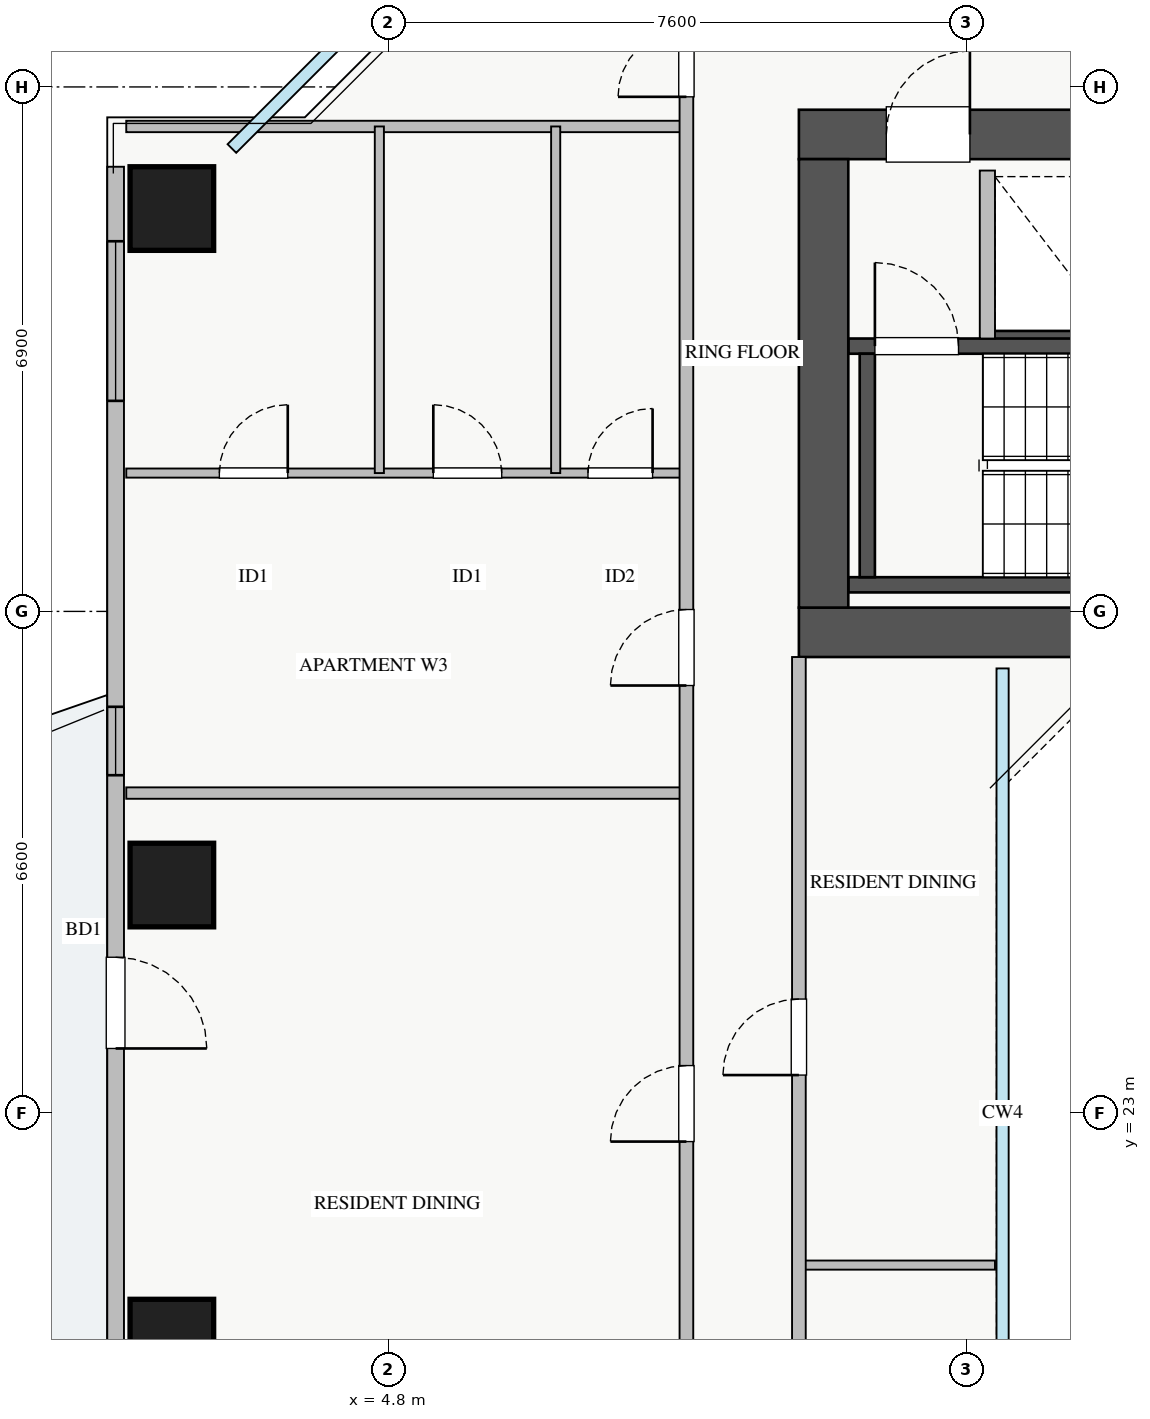
"""IFC4 building model, lengths in metres.
Left out: names, types, materials, properties, quantities, classifications, styles, units other than length and angle.
Written with IfcOpenShell. Run it as: python <this file> out.ifc"""

import sys

from ifc_helpers import new_model, si_unit, direction, frame, frame_2d, origin, origin_2d, place, context, subcontext, project, spatial, rectangle, extrude, source, transform, mapped, element, fill, save


model = new_model("IFC4")
c1 = context("Model", 3, precision=1e-05, world=origin(), true_north=direction((0.0, 1.0)))
c2 = subcontext(c1, "Body", "Model", "MODEL_VIEW")
j1 = project(units=[si_unit("LENGTHUNIT", "METRE"), si_unit("PLANEANGLEUNIT", "RADIAN")], contexts=[c1])
p1 = place(None, origin())
s1 = spatial("IfcSite", under=j1, at=p1, CompositionType="ELEMENT")
p2 = place(p1, origin())
s2 = spatial("IfcBuilding", under=s1, at=p2, CompositionType="ELEMENT")
p3 = place(p2, frame((0.0, 0.0, 126.25)))
s3 = spatial("IfcBuildingStorey", under=s2, at=p3, CompositionType="ELEMENT", Elevation=126.25)
p4 = place(p3, frame((12.68, 33.2, 0.0), z_axis=(0.0, 0.0, 1.0), x_axis=(1.0, 0.0, 0.0)))
e1 = element("IfcWall", 1, at=p4, inside=s3, PredefinedType="SHEAR", context=c2, shape_type="SweptSolid", body=[
    extrude(rectangle(XDim=1.94, YDim=0.18, at=frame_2d((0.97, 0.0))), origin(), (0.0, 0.0, 1.0), 3.07),
])
p5 = place(p3, frame((10.85, 29.95, 0.0), z_axis=(0.0, 0.0, 1.0), x_axis=(1.0, 0.0, 0.0)))
e2 = element("IfcWall", 2, at=p5, inside=s3, PredefinedType="SHEAR", context=c2, shape_type="SweptSolid", body=[
    extrude(rectangle(XDim=7.3, YDim=0.2, at=frame_2d((3.65, 0.0))), origin(), (0.0, 0.0, 1.0), 3.25),
])
p6 = place(p3, frame((10.85, 33.09, 0.0), z_axis=(0.0, 0.0, 1.0), x_axis=(1.0, 0.0, 0.0)))
e3 = element("IfcWall", 3, at=p6, inside=s3, PredefinedType="SHEAR", context=c2, shape_type="SweptSolid", body=[
    extrude(rectangle(XDim=7.3, YDim=0.2, at=frame_2d((3.65, 0.0))), origin(), (0.0, 0.0, 1.0), 3.25),
])
p7 = place(p6, frame((0.35, 0.0, 0.0)))
e4 = element("IfcOpeningElement", 4, at=p7, cuts=e3, PredefinedType="OPENING", context=c2, shape_type="SweptSolid", body=[
    extrude(rectangle(XDim=1.1, YDim=2.05, at=frame_2d((0.55, 1.025))), frame((0.0, 0.11, 0.0), z_axis=(0.0, -1.0, 0.0), x_axis=(1.0, 0.0, 0.0)), (0.0, 0.0, 1.0), 0.22),
])
p8 = place(p3, frame((11.1, 30.05, 0.0), z_axis=(0.0, 0.0, 1.0), x_axis=(0.0, 1.0, 0.0)))
e5 = element("IfcWall", 5, at=p8, inside=s3, PredefinedType="SHEAR", context=c2, shape_type="SweptSolid", body=[
    extrude(rectangle(XDim=2.94, YDim=0.2, at=frame_2d((1.47, 0.0))), origin(), (0.0, 0.0, 1.0), 3.25),
])
p9 = place(p3, frame((10.2, 29.325, 0.0), z_axis=(0.0, 0.0, 1.0), x_axis=(1.0, 0.0, 0.0)))
e6 = element("IfcWall", 6, at=p9, inside=s3, PredefinedType="SHEAR", context=c2, shape_type="SweptSolid", body=[
    extrude(rectangle(XDim=17.6, YDim=0.65, at=frame_2d((8.8, 0.0))), origin(), (0.0, 0.0, 1.0), 3.25),
])
p10 = place(p3, frame((10.2, 35.875, 0.0), z_axis=(0.0, 0.0, 1.0), x_axis=(1.0, 0.0, 0.0)))
e7 = element("IfcWall", 7, at=p10, inside=s3, PredefinedType="SHEAR", context=c2, shape_type="SweptSolid", body=[
    extrude(rectangle(XDim=17.6, YDim=0.65, at=frame_2d((8.8, 0.0))), origin(), (0.0, 0.0, 1.0), 3.25),
])
p11 = place(p10, frame((1.15, 0.0, 0.0)))
e8 = element("IfcOpeningElement", 8, at=p11, cuts=e7, PredefinedType="OPENING", context=c2, shape_type="SweptSolid", body=[
    extrude(rectangle(XDim=1.1, YDim=2.05, at=frame_2d((0.55, 1.025))), frame((0.0, 0.335, 0.0), z_axis=(0.0, -1.0, 0.0), x_axis=(1.0, 0.0, 0.0)), (0.0, 0.0, 1.0), 0.67),
])
p12 = place(p10, frame((8.3, 0.0, 0.0)))
e9 = element("IfcOpeningElement", 9, at=p12, cuts=e7, PredefinedType="OPENING", context=c2, shape_type="SweptSolid", body=[
    extrude(rectangle(XDim=1.1, YDim=2.05, at=frame_2d((0.55, 1.025))), frame((0.0, 0.335, 0.0), z_axis=(0.0, -1.0, 0.0), x_axis=(1.0, 0.0, 0.0)), (0.0, 0.0, 1.0), 0.67),
])
p13 = place(p10, frame((4.9, 0.0, 0.0)))
e10 = element("IfcOpeningElement", 10, at=p13, cuts=e7, PredefinedType="OPENING", context=c2, shape_type="SweptSolid", body=[
    extrude(rectangle(XDim=1.1, YDim=2.05, at=frame_2d((0.55, 1.025))), frame((0.0, 0.335, 0.0), z_axis=(0.0, -1.0, 0.0), x_axis=(1.0, 0.0, 0.0)), (0.0, 0.0, 1.0), 0.67),
])
p14 = place(p10, frame((14.74, 0.0, 0.0)))
e11 = element("IfcOpeningElement", 11, at=p14, cuts=e7, PredefinedType="OPENING", context=c2, shape_type="SweptSolid", body=[
    extrude(rectangle(XDim=1.0, YDim=2.05, at=frame_2d((0.5, 1.025))), frame((0.0, 0.335, 0.0), z_axis=(0.0, -1.0, 0.0), x_axis=(1.0, 0.0, 0.0)), (0.0, 0.0, 1.0), 0.67),
])
p15 = place(p10, frame((10.175, 0.0, 0.0)))
e12 = element("IfcOpeningElement", 12, at=p15, cuts=e7, PredefinedType="OPENING", context=c2, shape_type="SweptSolid", body=[
    extrude(rectangle(XDim=1.0, YDim=2.05, at=frame_2d((0.5, 1.025))), frame((0.0, 0.335, 0.0), z_axis=(0.0, -1.0, 0.0), x_axis=(1.0, 0.0, 0.0)), (0.0, 0.0, 1.0), 0.67),
])
p16 = place(p10, frame((12.625, 0.0, 0.0)))
e13 = element("IfcOpeningElement", 13, at=p16, cuts=e7, PredefinedType="OPENING", context=c2, shape_type="SweptSolid", body=[
    extrude(rectangle(XDim=1.0, YDim=2.05, at=frame_2d((0.5, 1.025))), frame((0.0, 0.335, 0.0), z_axis=(0.0, -1.0, 0.0), x_axis=(1.0, 0.0, 0.0)), (0.0, 0.0, 1.0), 0.67),
])
p17 = place(p3, frame((10.525, 29.65, 0.0), z_axis=(0.0, 0.0, 1.0), x_axis=(0.0, 1.0, 0.0)))
e14 = element("IfcWall", 14, at=p17, inside=s3, PredefinedType="SHEAR", context=c2, shape_type="SweptSolid", body=[
    extrude(rectangle(XDim=5.9, YDim=0.65, at=frame_2d((2.95, 0.0))), origin(), (0.0, 0.0, 1.0), 3.25),
])
m1 = source(origin(), c2, "Body", "SweptSolid", [
    extrude(rectangle(XDim=1.1, YDim=1.1, at=origin_2d()), origin(), (0.0, 0.0, 1.0), 3.25),
])
for number, where, z_axis, x_axis in (
    (15, (1.95, 34.9, 0.0), (0.0, 0.0, 1.0), (1.0, 0.0, 0.0)),
    (16, (1.95, 26.0, 0.0), (0.0, 0.0, 1.0), (1.0, 0.0, 0.0)),
    (17, (1.95, 20.0, 0.0), (0.0, 0.0, 1.0), (1.0, 0.0, 0.0)),
):
    element("IfcColumn", number, at=place(p3, frame(where, z_axis=z_axis, x_axis=x_axis)), inside=s3, PredefinedType="COLUMN", context=c2, shape_type="MappedRepresentation", body=[
        mapped(m1, transform((0.0, 0.0, 0.0), x_axis=(1.0, 0.0, 0.0), y_axis=(0.0, 1.0, 0.0), z_axis=(0.0, 0.0, 1.0), scale=1.0)),
    ])
p18 = place(p3, frame((1.21, 10.55, 0.0), z_axis=(0.0, 0.0, 1.0), x_axis=(0.0, 1.0, 0.0)))
e18 = element("IfcWall", 18, at=p18, inside=s3, PredefinedType="STANDARD", context=c2, shape_type="SweptSolid", body=[
    extrude(rectangle(XDim=24.9, YDim=0.22, at=frame_2d((12.45, 0.0))), origin(), (0.0, 0.0, 1.0), 2.61),
])
p19 = place(p18, frame((13.3, 0.0, 0.0)))
e19 = element("IfcOpeningElement", 19, at=p19, cuts=e18, PredefinedType="OPENING", context=c2, shape_type="SweptSolid", body=[
    extrude(rectangle(XDim=1.2, YDim=2.1, at=frame_2d((0.6, 1.05))), frame((0.0, 0.12, 0.0), z_axis=(0.0, -1.0, 0.0), x_axis=(1.0, 0.0, 0.0)), (0.0, 0.0, 1.0), 0.24),
])
p20 = place(p18, frame((0.625, 0.0, 0.9)))
e20 = element("IfcOpeningElement", 20, at=p20, cuts=e18, PredefinedType="OPENING", context=c2, shape_type="SweptSolid", body=[
    extrude(rectangle(XDim=2.4, YDim=1.5, at=frame_2d((1.2, 0.75))), frame((0.0, 0.12, 0.0), z_axis=(0.0, -1.0, 0.0), x_axis=(1.0, 0.0, 0.0)), (0.0, 0.0, 1.0), 0.24),
])
p21 = place(p18, frame((21.82, 0.0, 0.9)))
e21 = element("IfcOpeningElement", 21, at=p21, cuts=e18, PredefinedType="OPENING", context=c2, shape_type="SweptSolid", body=[
    extrude(rectangle(XDim=2.1, YDim=1.5, at=frame_2d((1.05, 0.75))), frame((0.0, 0.12, 0.0), z_axis=(0.0, -1.0, 0.0), x_axis=(1.0, 0.0, 0.0)), (0.0, 0.0, 1.0), 0.24),
])
p22 = place(p18, frame((4.847, 0.0, 0.9)))
e22 = element("IfcOpeningElement", 22, at=p22, cuts=e18, PredefinedType="OPENING", context=c2, shape_type="SweptSolid", body=[
    extrude(rectangle(XDim=2.4, YDim=1.5, at=frame_2d((1.2, 0.75))), frame((0.0, 0.12, 0.0), z_axis=(0.0, -1.0, 0.0), x_axis=(1.0, 0.0, 0.0)), (0.0, 0.0, 1.0), 0.24),
])
p23 = place(p18, frame((16.895, 0.0, 0.9)))
e23 = element("IfcOpeningElement", 23, at=p23, cuts=e18, PredefinedType="OPENING", context=c2, shape_type="SweptSolid", body=[
    extrude(rectangle(XDim=0.9, YDim=1.2, at=frame_2d((0.45, 0.6))), frame((0.0, 0.12, 0.0), z_axis=(0.0, -1.0, 0.0), x_axis=(1.0, 0.0, 0.0)), (0.0, 0.0, 1.0), 0.24),
])
p24 = place(p3, frame((12.68, 33.19, 0.0), z_axis=(0.0, 0.0, 1.0), x_axis=(0.0, 1.0, 0.0)))
e24 = element("IfcWall", 24, at=p24, inside=s3, PredefinedType="PARTITIONING", context=c2, shape_type="SweptSolid", body=[
    extrude(rectangle(XDim=2.21, YDim=0.2, at=frame_2d((1.105, 0.0))), origin(), (0.0, 0.0, 1.0), 3.07),
])
p25 = place(p3, frame((1.35, 35.98, 0.0), z_axis=(0.0, 0.0, 1.0), x_axis=(1.0, 0.0, 0.0)))
e25 = element("IfcWall", 25, at=p25, inside=s3, PredefinedType="PARTITIONING", context=c2, shape_type="SweptSolid", body=[
    extrude(rectangle(XDim=7.37, YDim=0.15, at=frame_2d((3.685, 0.0))), origin(), (0.0, 0.0, 1.0), 3.07),
])
p26 = place(p3, frame((1.35, 31.42, 0.0), z_axis=(0.0, 0.0, 1.0), x_axis=(1.0, 0.0, 0.0)))
e26 = element("IfcWall", 26, at=p26, inside=s3, PredefinedType="PLUMBINGWALL", context=c2, shape_type="SweptSolid", body=[
    extrude(rectangle(XDim=7.37, YDim=0.12, at=frame_2d((3.685, 0.0))), origin(), (0.0, 0.0, 1.0), 3.07),
])
p27 = place(p26, frame((1.225, 0.0, 0.0)))
e27 = element("IfcOpeningElement", 27, at=p27, cuts=e26, PredefinedType="OPENING", context=c2, shape_type="SweptSolid", body=[
    extrude(rectangle(XDim=0.9, YDim=2.05, at=frame_2d((0.45, 1.025))), frame((0.0, 0.07, 0.0), z_axis=(0.0, -1.0, 0.0), x_axis=(1.0, 0.0, 0.0)), (0.0, 0.0, 1.0), 0.14),
])
p28 = place(p26, frame((4.04, 0.0, 0.0)))
e28 = element("IfcOpeningElement", 28, at=p28, cuts=e26, PredefinedType="OPENING", context=c2, shape_type="SweptSolid", body=[
    extrude(rectangle(XDim=0.9, YDim=2.05, at=frame_2d((0.45, 1.025))), frame((0.0, 0.07, 0.0), z_axis=(0.0, -1.0, 0.0), x_axis=(1.0, 0.0, 0.0)), (0.0, 0.0, 1.0), 0.14),
])
p29 = place(p26, frame((6.075, 0.0, 0.0)))
e29 = element("IfcOpeningElement", 29, at=p29, cuts=e26, PredefinedType="OPENING", context=c2, shape_type="SweptSolid", body=[
    extrude(rectangle(XDim=0.85, YDim=2.05, at=frame_2d((0.425, 1.025))), frame((0.0, 0.07, 0.0), z_axis=(0.0, -1.0, 0.0), x_axis=(1.0, 0.0, 0.0)), (0.0, 0.0, 1.0), 0.14),
])
p30 = place(p3, frame((4.68, 31.42, 0.0), z_axis=(0.0, 0.0, 1.0), x_axis=(0.0, 1.0, 0.0)))
e30 = element("IfcWall", 30, at=p30, inside=s3, PredefinedType="PLUMBINGWALL", context=c2, shape_type="SweptSolid", body=[
    extrude(rectangle(XDim=4.56, YDim=0.12, at=frame_2d((2.28, 0.0))), origin(), (0.0, 0.0, 1.0), 3.07),
])
p31 = place(p3, frame((7.0, 31.42, 0.0), z_axis=(0.0, 0.0, 1.0), x_axis=(0.0, 1.0, 0.0)))
e31 = element("IfcWall", 31, at=p31, inside=s3, PredefinedType="PLUMBINGWALL", context=c2, shape_type="SweptSolid", body=[
    extrude(rectangle(XDim=4.56, YDim=0.12, at=frame_2d((2.28, 0.0))), origin(), (0.0, 0.0, 1.0), 2.577),
])
p32 = place(p3, frame((1.35, 27.21, 0.0), z_axis=(0.0, 0.0, 1.0), x_axis=(1.0, 0.0, 0.0)))
e32 = element("IfcWall", 32, at=p32, inside=s3, PredefinedType="PARTITIONING", context=c2, shape_type="SweptSolid", body=[
    extrude(rectangle(XDim=7.37, YDim=0.15, at=frame_2d((3.685, 0.0))), origin(), (0.0, 0.0, 1.0), 3.07),
])
p33 = place(p3, frame((8.72, 8.31, 0.0), z_axis=(0.0, 0.0, 1.0), x_axis=(0.0, 1.0, 0.0)))
e33 = element("IfcWall", 33, at=p33, inside=s3, PredefinedType="PARTITIONING", context=c2, shape_type="SweptSolid", body=[
    extrude(rectangle(XDim=29.37, YDim=0.18, at=frame_2d((14.685, 0.0))), origin(), (0.0, 0.0, 1.0), 3.07),
])
p34 = place(p33, frame((28.06, 0.0, 0.0)))
e34 = element("IfcOpeningElement", 34, at=p34, cuts=e33, PredefinedType="OPENING", context=c2, shape_type="SweptSolid", body=[
    extrude(rectangle(XDim=0.9, YDim=2.05, at=frame_2d((0.45, 1.025))), frame((0.0, 0.1, 0.0), z_axis=(0.0, -1.0, 0.0), x_axis=(1.0, 0.0, 0.0)), (0.0, 0.0, 1.0), 0.2),
])
p35 = place(p33, frame((0.24, 0.0, 0.0)))
e35 = element("IfcOpeningElement", 35, at=p35, cuts=e33, PredefinedType="OPENING", context=c2, shape_type="SweptSolid", body=[
    extrude(rectangle(XDim=0.9, YDim=2.05, at=frame_2d((0.45, 1.025))), frame((0.0, 0.1, 0.0), z_axis=(0.0, -1.0, 0.0), x_axis=(1.0, 0.0, 0.0)), (0.0, 0.0, 1.0), 0.2),
])
p36 = place(p33, frame((2.92, 0.0, 0.0)))
e36 = element("IfcOpeningElement", 36, at=p36, cuts=e33, PredefinedType="OPENING", context=c2, shape_type="SweptSolid", body=[
    extrude(rectangle(XDim=1.0, YDim=2.05, at=frame_2d((0.5, 1.025))), frame((0.0, 0.1, 0.0), z_axis=(0.0, -1.0, 0.0), x_axis=(1.0, 0.0, 0.0)), (0.0, 0.0, 1.0), 0.2),
])
p37 = place(p33, frame((14.315, 0.0, 0.0)))
e37 = element("IfcOpeningElement", 37, at=p37, cuts=e33, PredefinedType="OPENING", context=c2, shape_type="SweptSolid", body=[
    extrude(rectangle(XDim=1.0, YDim=2.05, at=frame_2d((0.5, 1.025))), frame((0.0, 0.1, 0.0), z_axis=(0.0, -1.0, 0.0), x_axis=(1.0, 0.0, 0.0)), (0.0, 0.0, 1.0), 0.2),
])
p38 = place(p33, frame((20.315, 0.0, 0.0)))
e38 = element("IfcOpeningElement", 38, at=p38, cuts=e33, PredefinedType="OPENING", context=c2, shape_type="SweptSolid", body=[
    extrude(rectangle(XDim=1.0, YDim=2.05, at=frame_2d((0.5, 1.025))), frame((0.0, 0.1, 0.0), z_axis=(0.0, -1.0, 0.0), x_axis=(1.0, 0.0, 0.0)), (0.0, 0.0, 1.0), 0.2),
])
p39 = place(p3, frame((10.2, 21.0, 0.0), z_axis=(0.0, 0.0, 1.0), x_axis=(1.0, 0.0, 0.0)))
e39 = element("IfcWall", 39, at=p39, inside=s3, PredefinedType="PLUMBINGWALL", context=c2, shape_type="SweptSolid", body=[
    extrude(rectangle(XDim=2.58, YDim=0.12, at=frame_2d((1.29, 0.0))), origin(), (0.0, 0.0, 1.0), 3.07),
])
p40 = place(p3, frame((10.2, 17.0, 0.0), z_axis=(0.0, 0.0, 1.0), x_axis=(0.0, 1.0, 0.0)))
e40 = element("IfcWall", 40, at=p40, inside=s3, PredefinedType="PARTITIONING", context=c2, shape_type="SweptSolid", body=[
    extrude(rectangle(XDim=12.0, YDim=0.18, at=frame_2d((6.0, 0.0))), origin(), (0.0, 0.0, 1.0), 3.07),
])
p41 = place(p40, frame((1.5, 0.0, 0.0)))
e41 = element("IfcOpeningElement", 41, at=p41, cuts=e40, PredefinedType="OPENING", context=c2, shape_type="SweptSolid", body=[
    extrude(rectangle(XDim=0.85, YDim=2.05, at=frame_2d((0.425, 1.025))), frame((0.0, 0.1, 0.0), z_axis=(0.0, -1.0, 0.0), x_axis=(1.0, 0.0, 0.0)), (0.0, 0.0, 1.0), 0.2),
])
p42 = place(p40, frame((6.5, 0.0, 0.0)))
e42 = element("IfcOpeningElement", 42, at=p42, cuts=e40, PredefinedType="OPENING", context=c2, shape_type="SweptSolid", body=[
    extrude(rectangle(XDim=1.0, YDim=2.05, at=frame_2d((0.5, 1.025))), frame((0.0, 0.1, 0.0), z_axis=(0.0, -1.0, 0.0), x_axis=(1.0, 0.0, 0.0)), (0.0, 0.0, 1.0), 0.2),
])
m2 = source(origin(), c2, "Body", "SweptSolid", [
    extrude(rectangle(XDim=1.2, YDim=2.1, at=frame_2d((0.6, 1.05))), frame((0.0, 0.025, 0.0), z_axis=(0.0, -1.0, 0.0), x_axis=(1.0, 0.0, 0.0)), (0.0, 0.0, 1.0), 0.05),
])
p43 = place(p19, frame((1.2, 0.0, 0.0), z_axis=(0.0, 0.0, 1.0), x_axis=(-1.0, 0.0, 0.0)))
e43 = element("IfcDoor", 43, at=p43, inside=s3, OperationType="SINGLE_SWING_LEFT", PredefinedType="DOOR", context=c2, shape_type="MappedRepresentation", body=[
    mapped(m2, transform((0.0, 0.0, 0.0), x_axis=(1.0, 0.0, 0.0), y_axis=(0.0, 1.0, 0.0), z_axis=(0.0, 0.0, 1.0), scale=1.0)),
])
fill(e19, e43)
m3 = source(origin(), c2, "Body", "SweptSolid", [
    extrude(rectangle(XDim=2.1, YDim=1.5, at=frame_2d((1.05, 0.75))), frame((0.0, 0.03, 0.0), z_axis=(0.0, -1.0, 0.0), x_axis=(1.0, 0.0, 0.0)), (0.0, 0.0, 1.0), 0.06),
])
p44 = place(p21, origin())
e44 = element("IfcWindow", 44, at=p44, inside=s3, PartitioningType="TRIPLE_PANEL_VERTICAL", PredefinedType="WINDOW", context=c2, shape_type="MappedRepresentation", body=[
    mapped(m3, transform((0.0, 0.0, 0.0), x_axis=(1.0, 0.0, 0.0), y_axis=(0.0, 1.0, 0.0), z_axis=(0.0, 0.0, 1.0), scale=1.0)),
])
fill(e21, e44)
m4 = source(origin(), c2, "Body", "SweptSolid", [
    extrude(rectangle(XDim=1.1, YDim=2.05, at=frame_2d((0.55, 1.025))), frame((0.0, 0.025, 0.0), z_axis=(0.0, -1.0, 0.0), x_axis=(1.0, 0.0, 0.0)), (0.0, 0.0, 1.0), 0.05),
])
p45 = place(p11, origin())
e45 = element("IfcDoor", 45, at=p45, inside=s3, OperationType="SINGLE_SWING_RIGHT", PredefinedType="DOOR", context=c2, shape_type="MappedRepresentation", body=[
    mapped(m4, transform((0.0, 0.0, 0.0), x_axis=(1.0, 0.0, 0.0), y_axis=(0.0, 1.0, 0.0), z_axis=(0.0, 0.0, 1.0), scale=1.0)),
])
fill(e8, e45)
p46 = place(p7, origin())
e46 = element("IfcDoor", 46, at=p46, inside=s3, OperationType="SINGLE_SWING_LEFT", PredefinedType="DOOR", context=c2, shape_type="MappedRepresentation", body=[
    mapped(m4, transform((0.0, 0.0, 0.0), x_axis=(1.0, 0.0, 0.0), y_axis=(0.0, 1.0, 0.0), z_axis=(0.0, 0.0, 1.0), scale=1.0)),
])
fill(e4, e46)
m5 = source(origin(), c2, "Body", "SweptSolid", [
    extrude(rectangle(XDim=0.9, YDim=2.05, at=frame_2d((0.45, 1.025))), frame((0.0, 0.025, 0.0), z_axis=(0.0, -1.0, 0.0), x_axis=(1.0, 0.0, 0.0)), (0.0, 0.0, 1.0), 0.05),
])
p47 = place(p27, origin())
e47 = element("IfcDoor", 47, at=p47, inside=s3, OperationType="SINGLE_SWING_RIGHT", PredefinedType="DOOR", context=c2, shape_type="MappedRepresentation", body=[
    mapped(m5, transform((0.0, 0.0, 0.0), x_axis=(1.0, 0.0, 0.0), y_axis=(0.0, 1.0, 0.0), z_axis=(0.0, 0.0, 1.0), scale=1.0)),
])
fill(e27, e47)
p48 = place(p28, origin())
e48 = element("IfcDoor", 48, at=p48, inside=s3, OperationType="SINGLE_SWING_LEFT", PredefinedType="DOOR", context=c2, shape_type="MappedRepresentation", body=[
    mapped(m5, transform((0.0, 0.0, 0.0), x_axis=(1.0, 0.0, 0.0), y_axis=(0.0, 1.0, 0.0), z_axis=(0.0, 0.0, 1.0), scale=1.0)),
])
fill(e28, e48)
m6 = source(origin(), c2, "Body", "SweptSolid", [
    extrude(rectangle(XDim=0.85, YDim=2.05, at=frame_2d((0.425, 1.025))), frame((0.0, 0.025, 0.0), z_axis=(0.0, -1.0, 0.0), x_axis=(1.0, 0.0, 0.0)), (0.0, 0.0, 1.0), 0.05),
])
p49 = place(p29, origin())
e49 = element("IfcDoor", 49, at=p49, inside=s3, OperationType="SINGLE_SWING_RIGHT", PredefinedType="DOOR", context=c2, shape_type="MappedRepresentation", body=[
    mapped(m6, transform((0.0, 0.0, 0.0), x_axis=(1.0, 0.0, 0.0), y_axis=(0.0, 1.0, 0.0), z_axis=(0.0, 0.0, 1.0), scale=1.0)),
])
fill(e29, e49)
p50 = place(p34, origin())
e50 = element("IfcDoor", 50, at=p50, inside=s3, OperationType="SINGLE_SWING_LEFT", PredefinedType="DOOR", context=c2, shape_type="MappedRepresentation", body=[
    mapped(m5, transform((0.0, 0.0, 0.0), x_axis=(1.0, 0.0, 0.0), y_axis=(0.0, 1.0, 0.0), z_axis=(0.0, 0.0, 1.0), scale=1.0)),
])
fill(e34, e50)
m7 = source(origin(), c2, "Body", "SweptSolid", [
    extrude(rectangle(XDim=1.0, YDim=2.05, at=frame_2d((0.5, 1.025))), frame((0.0, 0.025, 0.0), z_axis=(0.0, -1.0, 0.0), x_axis=(1.0, 0.0, 0.0)), (0.0, 0.0, 1.0), 0.05),
])
p51 = place(p37, origin())
e51 = element("IfcDoor", 51, at=p51, inside=s3, OperationType="SINGLE_SWING_LEFT", PredefinedType="DOOR", context=c2, shape_type="MappedRepresentation", body=[
    mapped(m7, transform((0.0, 0.0, 0.0), x_axis=(1.0, 0.0, 0.0), y_axis=(0.0, 1.0, 0.0), z_axis=(0.0, 0.0, 1.0), scale=1.0)),
])
fill(e37, e51)
p52 = place(p38, origin())
e52 = element("IfcDoor", 52, at=p52, inside=s3, OperationType="SINGLE_SWING_LEFT", PredefinedType="DOOR", context=c2, shape_type="MappedRepresentation", body=[
    mapped(m7, transform((0.0, 0.0, 0.0), x_axis=(1.0, 0.0, 0.0), y_axis=(0.0, 1.0, 0.0), z_axis=(0.0, 0.0, 1.0), scale=1.0)),
])
fill(e38, e52)
p53 = place(p42, origin())
e53 = element("IfcDoor", 53, at=p53, inside=s3, OperationType="SINGLE_SWING_LEFT", PredefinedType="DOOR", context=c2, shape_type="MappedRepresentation", body=[
    mapped(m7, transform((0.0, 0.0, 0.0), x_axis=(1.0, 0.0, 0.0), y_axis=(0.0, 1.0, 0.0), z_axis=(0.0, 0.0, 1.0), scale=1.0)),
])
fill(e42, e53)
m8 = source(origin(), c2, "Body", "SweptSolid", [
    extrude(rectangle(XDim=0.9, YDim=1.2, at=frame_2d((0.45, 0.6))), frame((0.0, 0.03, 0.0), z_axis=(0.0, -1.0, 0.0), x_axis=(1.0, 0.0, 0.0)), (0.0, 0.0, 1.0), 0.06),
])
p54 = place(p23, origin())
e54 = element("IfcWindow", 54, at=p54, inside=s3, PartitioningType="SINGLE_PANEL", PredefinedType="WINDOW", context=c2, shape_type="MappedRepresentation", body=[
    mapped(m8, transform((0.0, 0.0, 0.0), x_axis=(1.0, 0.0, 0.0), y_axis=(0.0, 1.0, 0.0), z_axis=(0.0, 0.0, 1.0), scale=1.0)),
])
fill(e23, e54)
save(model, sys.argv[1])
